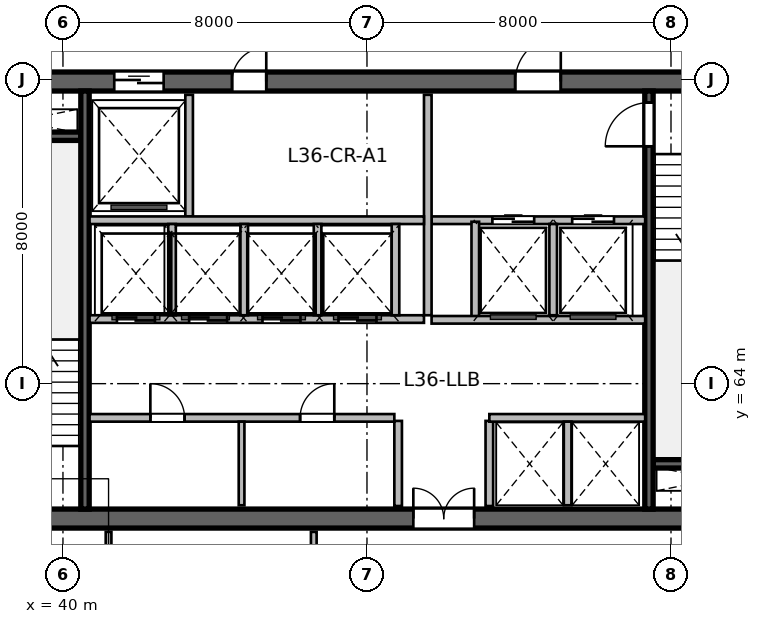
"""IFC4 building model, lengths in metres.
Left out: names, types, materials, properties, quantities, classifications, styles, units other than length and angle.
Written with IfcOpenShell. Run it as: python <this file> out.ifc"""

import sys

from ifc_helpers import new_model, si_unit, direction, frame, frame_2d, origin, place, context, subcontext, project, spatial, rectangle, extrude, source, transform, mapped, element, fill, save


model = new_model("IFC4")
c1 = context("Model", 3, precision=1e-05, world=origin(), true_north=direction((0.0, 1.0)))
c2 = subcontext(c1, "Body", "Model", "MODEL_VIEW")
j1 = project(units=[si_unit("LENGTHUNIT", "METRE"), si_unit("PLANEANGLEUNIT", "RADIAN")], contexts=[c1])
p1 = place(None, origin())
s1 = spatial("IfcSite", under=j1, at=p1, CompositionType="ELEMENT")
p2 = place(p1, origin())
s2 = spatial("IfcBuilding", under=s1, at=p2, CompositionType="ELEMENT")
p3 = place(p2, frame((0.0, 0.0, 150.6)))
s3 = spatial("IfcBuildingStorey", under=s2, at=p3, CompositionType="ELEMENT", Elevation=150.6)
m1 = source(origin(), c2, "Body", "SweptSolid", [
    extrude(rectangle(XDim=21.6, YDim=0.5, at=frame_2d((10.8, 0.0))), origin(), (0.0, 0.0, 1.0), 3.9),
])
p4 = place(p3, frame((37.2, 60.45, 0.0), z_axis=(0.0, 0.0, 1.0), x_axis=(1.0, 0.0, 0.0)))
e1 = element("IfcWall", 1, at=p4, inside=s3, PredefinedType="SHEAR", context=c2, shape_type="MappedRepresentation", body=[
    mapped(m1, transform((0.0, 0.0, 0.0), scale=1.0)),
])
p5 = place(p4, frame((1.1, 0.0, 0.0)))
e2 = element("IfcOpeningElement", 2, at=p5, cuts=e1, PredefinedType="OPENING", context=c2, shape_type="SweptSolid", body=[
    extrude(rectangle(XDim=1.15, YDim=2.15, at=frame_2d((0.575, 1.075))), frame((0.0, 0.26, 0.0), z_axis=(0.0, -1.0, 0.0), x_axis=(1.0, 0.0, 0.0)), (0.0, 0.0, 1.0), 0.52),
])
p6 = place(p4, frame((19.5, 0.0, 0.0)))
e3 = element("IfcOpeningElement", 3, at=p6, cuts=e1, PredefinedType="OPENING", context=c2, shape_type="SweptSolid", body=[
    extrude(rectangle(XDim=0.9, YDim=2.1, at=frame_2d((0.45, 1.05))), frame((0.0, 0.26, 0.0), z_axis=(0.0, -1.0, 0.0), x_axis=(1.0, 0.0, 0.0)), (0.0, 0.0, 1.0), 0.52),
])
p7 = place(p4, frame((12.02, 0.0, 0.0)))
e4 = element("IfcOpeningElement", 4, at=p7, cuts=e1, PredefinedType="OPENING", context=c2, shape_type="SweptSolid", body=[
    extrude(rectangle(XDim=1.6, YDim=2.15, at=frame_2d((0.8, 1.075))), frame((0.0, 0.26, 0.0), z_axis=(0.0, -1.0, 0.0), x_axis=(1.0, 0.0, 0.0)), (0.0, 0.0, 1.0), 0.52),
])
p8 = place(p3, frame((37.2, 71.95, 0.0), z_axis=(0.0, 0.0, 1.0), x_axis=(1.0, 0.0, 0.0)))
e5 = element("IfcWall", 5, at=p8, inside=s3, PredefinedType="SHEAR", context=c2, shape_type="MappedRepresentation", body=[
    mapped(m1, transform((0.0, 0.0, 0.0), scale=1.0)),
])
p9 = place(p8, frame((1.2, 0.0, 0.0)))
e6 = element("IfcOpeningElement", 6, at=p9, cuts=e5, PredefinedType="OPENING", context=c2, shape_type="SweptSolid", body=[
    extrude(rectangle(XDim=0.9, YDim=2.1, at=frame_2d((0.45, 1.05))), frame((0.0, 0.26, 0.0), z_axis=(0.0, -1.0, 0.0), x_axis=(1.0, 0.0, 0.0)), (0.0, 0.0, 1.0), 0.52),
])
p10 = place(p8, frame((14.7, 0.0, 0.0)))
e7 = element("IfcOpeningElement", 7, at=p10, cuts=e5, PredefinedType="OPENING", context=c2, shape_type="SweptSolid", body=[
    extrude(rectangle(XDim=1.2, YDim=2.15, at=frame_2d((0.6, 1.075))), frame((0.0, 0.26, 0.0), z_axis=(0.0, -1.0, 0.0), x_axis=(1.0, 0.0, 0.0)), (0.0, 0.0, 1.0), 0.52),
])
p11 = place(p8, frame((4.15, 0.0, 0.0)))
e8 = element("IfcOpeningElement", 8, at=p11, cuts=e5, PredefinedType="OPENING", context=c2, shape_type="SweptSolid", body=[
    extrude(rectangle(XDim=1.3, YDim=2.15, at=frame_2d((0.65, 1.075))), frame((0.0, 0.26, 0.0), z_axis=(0.0, -1.0, 0.0), x_axis=(1.0, 0.0, 0.0)), (0.0, 0.0, 1.0), 0.52),
])
p12 = place(p8, frame((7.25, 0.0, 0.0)))
e9 = element("IfcOpeningElement", 9, at=p12, cuts=e5, PredefinedType="OPENING", context=c2, shape_type="SweptSolid", body=[
    extrude(rectangle(XDim=0.9, YDim=2.1, at=frame_2d((0.45, 1.05))), frame((0.0, 0.26, 0.0), z_axis=(0.0, -1.0, 0.0), x_axis=(1.0, 0.0, 0.0)), (0.0, 0.0, 1.0), 0.52),
])
m2 = source(origin(), c2, "Body", "SweptSolid", [
    extrude(rectangle(XDim=3.27, YDim=0.22, at=frame_2d((1.635, 0.0))), origin(), (0.0, 0.0, 1.0), 3.9),
])
for number, where, z_axis, x_axis in (
    (10, (37.2, 70.51, 0.0), (0.0, 0.0, 1.0), (1.0, 0.0, 0.0)),
    (11, (55.53, 61.89, 0.0), (0.0, 0.0, 1.0), (1.0, 0.0, 0.0)),
):
    element("IfcWall", number, at=place(p3, frame(where, z_axis=z_axis, x_axis=x_axis)), inside=s3, PredefinedType="SHEAR", context=c2, shape_type="MappedRepresentation", body=[
        mapped(m2, transform((0.0, 0.0, 0.0), scale=1.0)),
    ])
m3 = source(origin(), c2, "Body", "SweptSolid", [
    extrude(rectangle(XDim=11.0, YDim=0.22, at=frame_2d((5.5, 0.0))), origin(), (0.0, 0.0, 1.0), 3.9),
])
p13 = place(p3, frame((40.58, 60.7, 0.0), z_axis=(0.0, 0.0, 1.0), x_axis=(0.0, 1.0, 0.0)))
e12 = element("IfcWall", 12, at=p13, inside=s3, PredefinedType="SHEAR", context=c2, shape_type="MappedRepresentation", body=[
    mapped(m3, transform((0.0, 0.0, 0.0), scale=1.0)),
])
p14 = place(p3, frame((55.42, 60.7, 0.0), z_axis=(0.0, 0.0, 1.0), x_axis=(0.0, 1.0, 0.0)))
e13 = element("IfcWall", 13, at=p14, inside=s3, PredefinedType="SHEAR", context=c2, shape_type="MappedRepresentation", body=[
    mapped(m3, transform((0.0, 0.0, 0.0), scale=1.0)),
])
p15 = place(p14, frame((9.545, 0.0, 0.0)))
e14 = element("IfcOpeningElement", 14, at=p15, cuts=e13, PredefinedType="OPENING", context=c2, shape_type="SweptSolid", body=[
    extrude(rectangle(XDim=1.15, YDim=2.15, at=frame_2d((0.575, 1.075))), frame((0.0, 0.12, 0.0), z_axis=(0.0, -1.0, 0.0), x_axis=(1.0, 0.0, 0.0)), (0.0, 0.0, 1.0), 0.24),
])
m4 = source(origin(), c2, "Body", "SweptSolid", [
    extrude(rectangle(XDim=2.24, YDim=0.2, at=frame_2d((1.12, 0.0))), origin(), (0.0, 0.0, 1.0), 3.65),
])
for number, where, z_axis, x_axis in (
    (15, (48.82, 60.78, 0.0), (0.0, 0.0, 1.0), (0.0, 1.0, 0.0)),
    (16, (51.22, 60.78, 0.0), (0.0, 0.0, 1.0), (0.0, 1.0, 0.0)),
):
    element("IfcWall", number, at=place(p3, frame(where, z_axis=z_axis, x_axis=x_axis)), inside=s3, PredefinedType="SOLIDWALL", context=c2, shape_type="MappedRepresentation", body=[
        mapped(m4, transform((0.0, 0.0, 0.0), scale=1.0)),
    ])
m5 = source(origin(), c2, "Body", "SweptSolid", [
    extrude(rectangle(XDim=5.62, YDim=0.2, at=frame_2d((2.81, 0.0))), origin(), (0.0, 0.0, 1.0), 3.65),
])
p16 = place(p3, frame((49.7, 68.3, 0.0), z_axis=(0.0, 0.0, 1.0), x_axis=(1.0, 0.0, 0.0)))
e17 = element("IfcWall", 17, at=p16, inside=s3, PredefinedType="SOLIDWALL", context=c2, shape_type="MappedRepresentation", body=[
    mapped(m5, transform((0.0, 0.0, 0.0), scale=1.0)),
])
p17 = place(p16, frame((1.6, 0.0, 0.0)))
e18 = element("IfcOpeningElement", 18, at=p17, cuts=e17, PredefinedType="OPENING", context=c2, shape_type="SweptSolid", body=[
    extrude(rectangle(XDim=1.1, YDim=2.15, at=frame_2d((0.55, 1.075))), frame((0.0, 0.11, 0.0), z_axis=(0.0, -1.0, 0.0), x_axis=(1.0, 0.0, 0.0)), (0.0, 0.0, 1.0), 0.22),
])
p18 = place(p16, frame((3.7, 0.0, 0.0)))
e19 = element("IfcOpeningElement", 19, at=p18, cuts=e17, PredefinedType="OPENING", context=c2, shape_type="SweptSolid", body=[
    extrude(rectangle(XDim=1.1, YDim=2.15, at=frame_2d((0.55, 1.075))), frame((0.0, 0.11, 0.0), z_axis=(0.0, -1.0, 0.0), x_axis=(1.0, 0.0, 0.0)), (0.0, 0.0, 1.0), 0.22),
])
m6 = source(origin(), c2, "Body", "SweptSolid", [
    extrude(rectangle(XDim=5.8, YDim=0.2, at=frame_2d((2.9, 0.0))), origin(), (0.0, 0.0, 1.0), 3.65),
])
p19 = place(p3, frame((49.6, 65.8, 0.0), z_axis=(0.0, 0.0, 1.0), x_axis=(0.0, 1.0, 0.0)))
e20 = element("IfcWall", 20, at=p19, inside=s3, PredefinedType="SOLIDWALL", context=c2, shape_type="MappedRepresentation", body=[
    mapped(m6, transform((0.0, 0.0, 0.0), scale=1.0)),
])
m7 = source(origin(), c2, "Body", "SweptSolid", [
    extrude(rectangle(XDim=2.58, YDim=0.2, at=frame_2d((1.29, 0.0))), origin(), (0.0, 0.0, 1.0), 3.65),
])
p20 = place(p3, frame((50.85, 65.68, 0.0), z_axis=(0.0, 0.0, 1.0), x_axis=(0.0, 1.0, 0.0)))
e21 = element("IfcWall", 21, at=p20, inside=s3, PredefinedType="SOLIDWALL", context=c2, shape_type="MappedRepresentation", body=[
    mapped(m7, transform((0.0, 0.0, 0.0), scale=1.0)),
])
m8 = source(origin(), c2, "Body", "SweptSolid", [
    extrude(rectangle(XDim=2.4, YDim=0.2, at=frame_2d((1.2, 0.0))), origin(), (0.0, 0.0, 1.0), 3.65),
])
p21 = place(p3, frame((52.9, 65.8, 0.0), z_axis=(0.0, 0.0, 1.0), x_axis=(0.0, 1.0, 0.0)))
e22 = element("IfcWall", 22, at=p21, inside=s3, PredefinedType="SOLIDWALL", context=c2, shape_type="MappedRepresentation", body=[
    mapped(m8, transform((0.0, 0.0, 0.0), scale=1.0)),
])
p22 = place(p3, frame((49.7, 65.68, 0.0), z_axis=(0.0, 0.0, 1.0), x_axis=(1.0, 0.0, 0.0)))
e23 = element("IfcWall", 23, at=p22, inside=s3, PredefinedType="SOLIDWALL", context=c2, shape_type="MappedRepresentation", body=[
    mapped(m5, transform((0.0, 0.0, 0.0), scale=1.0)),
])
m9 = source(origin(), c2, "Body", "SweptSolid", [
    extrude(rectangle(XDim=3.2, YDim=0.2, at=frame_2d((1.6, 0.0))), origin(), (0.0, 0.0, 1.0), 3.65),
])
p23 = place(p3, frame((43.32, 68.4, 0.0), z_axis=(0.0, 0.0, 1.0), x_axis=(0.0, 1.0, 0.0)))
e24 = element("IfcWall", 24, at=p23, inside=s3, PredefinedType="SOLIDWALL", context=c2, shape_type="MappedRepresentation", body=[
    mapped(m9, transform((0.0, 0.0, 0.0), scale=1.0)),
])
m10 = source(origin(), c2, "Body", "SweptSolid", [
    extrude(rectangle(XDim=8.8, YDim=0.2, at=frame_2d((4.4, 0.0))), origin(), (0.0, 0.0, 1.0), 3.65),
])
p24 = place(p3, frame((40.7, 68.3, 0.0), z_axis=(0.0, 0.0, 1.0), x_axis=(1.0, 0.0, 0.0)))
e25 = element("IfcWall", 25, at=p24, inside=s3, PredefinedType="SOLIDWALL", context=c2, shape_type="MappedRepresentation", body=[
    mapped(m10, transform((0.0, 0.0, 0.0), scale=1.0)),
])
m11 = source(origin(), c2, "Body", "SweptSolid", [
    extrude(rectangle(XDim=8.02, YDim=0.2, at=frame_2d((4.01, 0.0))), origin(), (0.0, 0.0, 1.0), 3.65),
])
p25 = place(p3, frame((40.7, 63.1, 0.0), z_axis=(0.0, 0.0, 1.0), x_axis=(1.0, 0.0, 0.0)))
e26 = element("IfcWall", 26, at=p25, inside=s3, PredefinedType="SOLIDWALL", context=c2, shape_type="MappedRepresentation", body=[
    mapped(m11, transform((0.0, 0.0, 0.0), scale=1.0)),
])
p26 = place(p25, frame((1.6, 0.0, 0.0)))
e27 = element("IfcOpeningElement", 27, at=p26, cuts=e26, PredefinedType="OPENING", context=c2, shape_type="SweptSolid", body=[
    extrude(rectangle(XDim=0.9, YDim=2.1, at=frame_2d((0.45, 1.05))), frame((0.0, 0.11, 0.0), z_axis=(0.0, -1.0, 0.0), x_axis=(1.0, 0.0, 0.0)), (0.0, 0.0, 1.0), 0.22),
])
p27 = place(p25, frame((5.54, 0.0, 0.0)))
e28 = element("IfcOpeningElement", 28, at=p27, cuts=e26, PredefinedType="OPENING", context=c2, shape_type="SweptSolid", body=[
    extrude(rectangle(XDim=0.9, YDim=2.1, at=frame_2d((0.45, 1.05))), frame((0.0, 0.11, 0.0), z_axis=(0.0, -1.0, 0.0), x_axis=(1.0, 0.0, 0.0)), (0.0, 0.0, 1.0), 0.22),
])
m12 = source(origin(), c2, "Body", "SweptSolid", [
    extrude(rectangle(XDim=4.1, YDim=0.2, at=frame_2d((2.05, 0.0))), origin(), (0.0, 0.0, 1.0), 3.65),
])
p28 = place(p3, frame((51.22, 63.1, 0.0), z_axis=(0.0, 0.0, 1.0), x_axis=(1.0, 0.0, 0.0)))
e29 = element("IfcWall", 29, at=p28, inside=s3, PredefinedType="SOLIDWALL", context=c2, shape_type="MappedRepresentation", body=[
    mapped(m12, transform((0.0, 0.0, 0.0), scale=1.0)),
])
m13 = source(origin(), c2, "Body", "SweptSolid", [
    extrude(rectangle(XDim=2.2, YDim=0.15, at=frame_2d((1.1, 0.0))), origin(), (0.0, 0.0, 1.0), 3.65),
])
p29 = place(p3, frame((44.7, 60.8, 0.0), z_axis=(0.0, 0.0, 1.0), x_axis=(0.0, 1.0, 0.0)))
e30 = element("IfcWall", 30, at=p29, inside=s3, PredefinedType="PARTITIONING", context=c2, shape_type="MappedRepresentation", body=[
    mapped(m13, transform((0.0, 0.0, 0.0), scale=1.0)),
])
m14 = source(origin(), c2, "Body", "SweptSolid", [
    extrude(rectangle(XDim=2.2, YDim=0.2, at=frame_2d((1.1, 0.0))), origin(), (0.0, 0.0, 1.0), 3.65),
])
p30 = place(p3, frame((53.28, 60.8, 0.0), z_axis=(0.0, 0.0, 1.0), x_axis=(0.0, 1.0, 0.0)))
e31 = element("IfcWall", 31, at=p30, inside=s3, PredefinedType="SOLIDWALL", context=c2, shape_type="MappedRepresentation", body=[
    mapped(m14, transform((0.0, 0.0, 0.0), scale=1.0)),
])
p31 = place(p3, frame((40.7, 65.7, 0.0), z_axis=(0.0, 0.0, 1.0), x_axis=(1.0, 0.0, 0.0)))
e32 = element("IfcWall", 32, at=p31, inside=s3, PredefinedType="SOLIDWALL", context=c2, shape_type="MappedRepresentation", body=[
    mapped(m10, transform((0.0, 0.0, 0.0), scale=1.0)),
])
p32 = place(p31, frame((0.72, 0.0, 0.0)))
e33 = element("IfcOpeningElement", 33, at=p32, cuts=e32, PredefinedType="OPENING", context=c2, shape_type="SweptSolid", body=[
    extrude(rectangle(XDim=1.0, YDim=2.15, at=frame_2d((0.5, 1.075))), frame((0.0, 0.11, 0.0), z_axis=(0.0, -1.0, 0.0), x_axis=(1.0, 0.0, 0.0)), (0.0, 0.0, 1.0), 0.22),
])
p33 = place(p31, frame((2.62, 0.0, 0.0)))
e34 = element("IfcOpeningElement", 34, at=p33, cuts=e32, PredefinedType="OPENING", context=c2, shape_type="SweptSolid", body=[
    extrude(rectangle(XDim=1.0, YDim=2.15, at=frame_2d((0.5, 1.075))), frame((0.0, 0.11, 0.0), z_axis=(0.0, -1.0, 0.0), x_axis=(1.0, 0.0, 0.0)), (0.0, 0.0, 1.0), 0.22),
])
p34 = place(p31, frame((4.55, 0.0, 0.0)))
e35 = element("IfcOpeningElement", 35, at=p34, cuts=e32, PredefinedType="OPENING", context=c2, shape_type="SweptSolid", body=[
    extrude(rectangle(XDim=1.0, YDim=2.15, at=frame_2d((0.5, 1.075))), frame((0.0, 0.11, 0.0), z_axis=(0.0, -1.0, 0.0), x_axis=(1.0, 0.0, 0.0)), (0.0, 0.0, 1.0), 0.22),
])
p35 = place(p31, frame((6.55, 0.0, 0.0)))
e36 = element("IfcOpeningElement", 36, at=p35, cuts=e32, PredefinedType="OPENING", context=c2, shape_type="SweptSolid", body=[
    extrude(rectangle(XDim=1.0, YDim=2.15, at=frame_2d((0.5, 1.075))), frame((0.0, 0.11, 0.0), z_axis=(0.0, -1.0, 0.0), x_axis=(1.0, 0.0, 0.0)), (0.0, 0.0, 1.0), 0.22),
])
for number, where, z_axis, x_axis in (
    (37, (48.75, 65.8, 0.0), (0.0, 0.0, 1.0), (0.0, 1.0, 0.0)),
    (38, (42.87, 65.8, 0.0), (0.0, 0.0, 1.0), (0.0, 1.0, 0.0)),
    (39, (44.77, 65.8, 0.0), (0.0, 0.0, 1.0), (0.0, 1.0, 0.0)),
    (40, (46.7, 65.8, 0.0), (0.0, 0.0, 1.0), (0.0, 1.0, 0.0)),
):
    element("IfcWall", number, at=place(p3, frame(where, z_axis=z_axis, x_axis=x_axis)), inside=s3, PredefinedType="SOLIDWALL", context=c2, shape_type="MappedRepresentation", body=[
        mapped(m8, transform((0.0, 0.0, 0.0), scale=1.0)),
    ])
m15 = source(origin(), c2, "Body", "SweptSolid", [
    extrude(rectangle(XDim=2.033, YDim=0.15, at=frame_2d((1.016, 0.0))), origin(), (0.0, 0.0, 1.0), 3.65),
])
p36 = place(p3, frame((41.2, 58.067, 0.0), z_axis=(0.0, 0.0, 1.0), x_axis=(0.0, 1.0, 0.0)))
e41 = element("IfcWall", 41, at=p36, inside=s3, PredefinedType="PARTITIONING", context=c2, shape_type="MappedRepresentation", body=[
    mapped(m15, transform((0.0, 0.0, 0.0), scale=1.0)),
])
p37 = place(p36, frame((0.591, 0.0, 0.0)))
e42 = element("IfcOpeningElement", 42, at=p37, cuts=e41, PredefinedType="OPENING", context=c2, shape_type="SweptSolid", body=[
    extrude(rectangle(XDim=0.85, YDim=2.1, at=frame_2d((0.425, 1.05))), frame((0.0, 0.085, 0.0), z_axis=(0.0, -1.0, 0.0), x_axis=(1.0, 0.0, 0.0)), (0.0, 0.0, 1.0), 0.17),
])
p38 = place(p3, frame((46.6, 58.067, 0.0), z_axis=(0.0, 0.0, 1.0), x_axis=(0.0, 1.0, 0.0)))
e43 = element("IfcWall", 43, at=p38, inside=s3, PredefinedType="PARTITIONING", context=c2, shape_type="MappedRepresentation", body=[
    mapped(m15, transform((0.0, 0.0, 0.0), scale=1.0)),
])
m16 = source(origin(), c2, "Body", "SweptSolid", [
    extrude(rectangle(XDim=1.15, YDim=2.15, at=frame_2d((0.575, 1.075))), frame((0.0, 0.025, 0.0), z_axis=(0.0, -1.0, 0.0), x_axis=(1.0, 0.0, 0.0)), (0.0, 0.0, 1.0), 0.05),
])
p39 = place(p15, origin())
e44 = element("IfcDoor", 44, at=p39, inside=s3, OperationType="SINGLE_SWING_LEFT", PredefinedType="DOOR", context=c2, shape_type="MappedRepresentation", body=[
    mapped(m16, transform((0.0, 0.0, 0.0), scale=1.0)),
])
fill(e14, e44)
m17 = source(origin(), c2, "Body", "SweptSolid", [
    extrude(rectangle(XDim=1.6, YDim=2.15, at=frame_2d((0.8, 1.075))), frame((0.0, 0.025, 0.0), z_axis=(0.0, -1.0, 0.0), x_axis=(1.0, 0.0, 0.0)), (0.0, 0.0, 1.0), 0.05),
])
p40 = place(p7, origin())
e45 = element("IfcDoor", 45, at=p40, inside=s3, OperationType="DOUBLE_DOOR_SINGLE_SWING", PredefinedType="DOOR", context=c2, shape_type="MappedRepresentation", body=[
    mapped(m17, transform((0.0, 0.0, 0.0), scale=1.0)),
])
fill(e4, e45)
m18 = source(origin(), c2, "Body", "SweptSolid", [
    extrude(rectangle(XDim=1.2, YDim=2.15, at=frame_2d((0.6, 1.075))), frame((0.0, 0.025, 0.0), z_axis=(0.0, -1.0, 0.0), x_axis=(1.0, 0.0, 0.0)), (0.0, 0.0, 1.0), 0.05),
])
p41 = place(p10, origin())
e46 = element("IfcDoor", 46, at=p41, inside=s3, OperationType="SINGLE_SWING_RIGHT", PredefinedType="DOOR", context=c2, shape_type="MappedRepresentation", body=[
    mapped(m18, transform((0.0, 0.0, 0.0), scale=1.0)),
])
fill(e7, e46)
m19 = source(origin(), c2, "Body", "SweptSolid", [
    extrude(rectangle(XDim=1.1, YDim=2.15, at=frame_2d((0.55, 1.075))), frame((0.0, 0.025, 0.0), z_axis=(0.0, -1.0, 0.0), x_axis=(1.0, 0.0, 0.0)), (0.0, 0.0, 1.0), 0.05),
])
p42 = place(p17, origin())
e47 = element("IfcDoor", 47, at=p42, inside=s3, OperationType="DOUBLE_DOOR_SLIDING", PredefinedType="DOOR", context=c2, shape_type="MappedRepresentation", body=[
    mapped(m19, transform((0.0, 0.0, 0.0), scale=1.0)),
])
fill(e18, e47)
p43 = place(p18, origin())
e48 = element("IfcDoor", 48, at=p43, inside=s3, OperationType="DOUBLE_DOOR_SLIDING", PredefinedType="DOOR", context=c2, shape_type="MappedRepresentation", body=[
    mapped(m19, transform((0.0, 0.0, 0.0), scale=1.0)),
])
fill(e19, e48)
m20 = source(origin(), c2, "Body", "SweptSolid", [
    extrude(rectangle(XDim=1.3, YDim=2.15, at=frame_2d((0.65, 1.075))), frame((0.0, 0.025, 0.0), z_axis=(0.0, -1.0, 0.0), x_axis=(1.0, 0.0, 0.0)), (0.0, 0.0, 1.0), 0.05),
])
p44 = place(p11, origin())
e49 = element("IfcDoor", 49, at=p44, inside=s3, OperationType="DOUBLE_DOOR_SLIDING", PredefinedType="DOOR", context=c2, shape_type="MappedRepresentation", body=[
    mapped(m20, transform((0.0, 0.0, 0.0), scale=1.0)),
])
fill(e8, e49)
m21 = source(origin(), c2, "Body", "SweptSolid", [
    extrude(rectangle(XDim=0.9, YDim=2.1, at=frame_2d((0.45, 1.05))), frame((0.0, 0.025, 0.0), z_axis=(0.0, -1.0, 0.0), x_axis=(1.0, 0.0, 0.0)), (0.0, 0.0, 1.0), 0.05),
])
p45 = place(p12, origin())
e50 = element("IfcDoor", 50, at=p45, inside=s3, OperationType="SINGLE_SWING_RIGHT", PredefinedType="DOOR", context=c2, shape_type="MappedRepresentation", body=[
    mapped(m21, transform((0.0, 0.0, 0.0), scale=1.0)),
])
fill(e9, e50)
p46 = place(p26, origin())
e51 = element("IfcDoor", 51, at=p46, inside=s3, OperationType="SINGLE_SWING_LEFT", PredefinedType="DOOR", context=c2, shape_type="MappedRepresentation", body=[
    mapped(m21, transform((0.0, 0.0, 0.0), scale=1.0)),
])
fill(e27, e51)
p47 = place(p27, origin())
e52 = element("IfcDoor", 52, at=p47, inside=s3, OperationType="SINGLE_SWING_RIGHT", PredefinedType="DOOR", context=c2, shape_type="MappedRepresentation", body=[
    mapped(m21, transform((0.0, 0.0, 0.0), scale=1.0)),
])
fill(e28, e52)
m22 = source(origin(), c2, "Body", "SweptSolid", [
    extrude(rectangle(XDim=1.0, YDim=2.15, at=frame_2d((0.5, 1.075))), frame((0.0, 0.025, 0.0), z_axis=(0.0, -1.0, 0.0), x_axis=(1.0, 0.0, 0.0)), (0.0, 0.0, 1.0), 0.05),
])
p48 = place(p32, origin())
e53 = element("IfcDoor", 53, at=p48, inside=s3, OperationType="DOUBLE_DOOR_SLIDING", PredefinedType="DOOR", context=c2, shape_type="MappedRepresentation", body=[
    mapped(m22, transform((0.0, 0.0, 0.0), scale=1.0)),
])
fill(e33, e53)
p49 = place(p33, origin())
e54 = element("IfcDoor", 54, at=p49, inside=s3, OperationType="DOUBLE_DOOR_SLIDING", PredefinedType="DOOR", context=c2, shape_type="MappedRepresentation", body=[
    mapped(m22, transform((0.0, 0.0, 0.0), scale=1.0)),
])
fill(e34, e54)
p50 = place(p34, origin())
e55 = element("IfcDoor", 55, at=p50, inside=s3, OperationType="DOUBLE_DOOR_SLIDING", PredefinedType="DOOR", context=c2, shape_type="MappedRepresentation", body=[
    mapped(m22, transform((0.0, 0.0, 0.0), scale=1.0)),
])
fill(e35, e55)
p51 = place(p35, origin())
e56 = element("IfcDoor", 56, at=p51, inside=s3, OperationType="DOUBLE_DOOR_SLIDING", PredefinedType="DOOR", context=c2, shape_type="MappedRepresentation", body=[
    mapped(m22, transform((0.0, 0.0, 0.0), scale=1.0)),
])
fill(e36, e56)
save(model, sys.argv[1])
